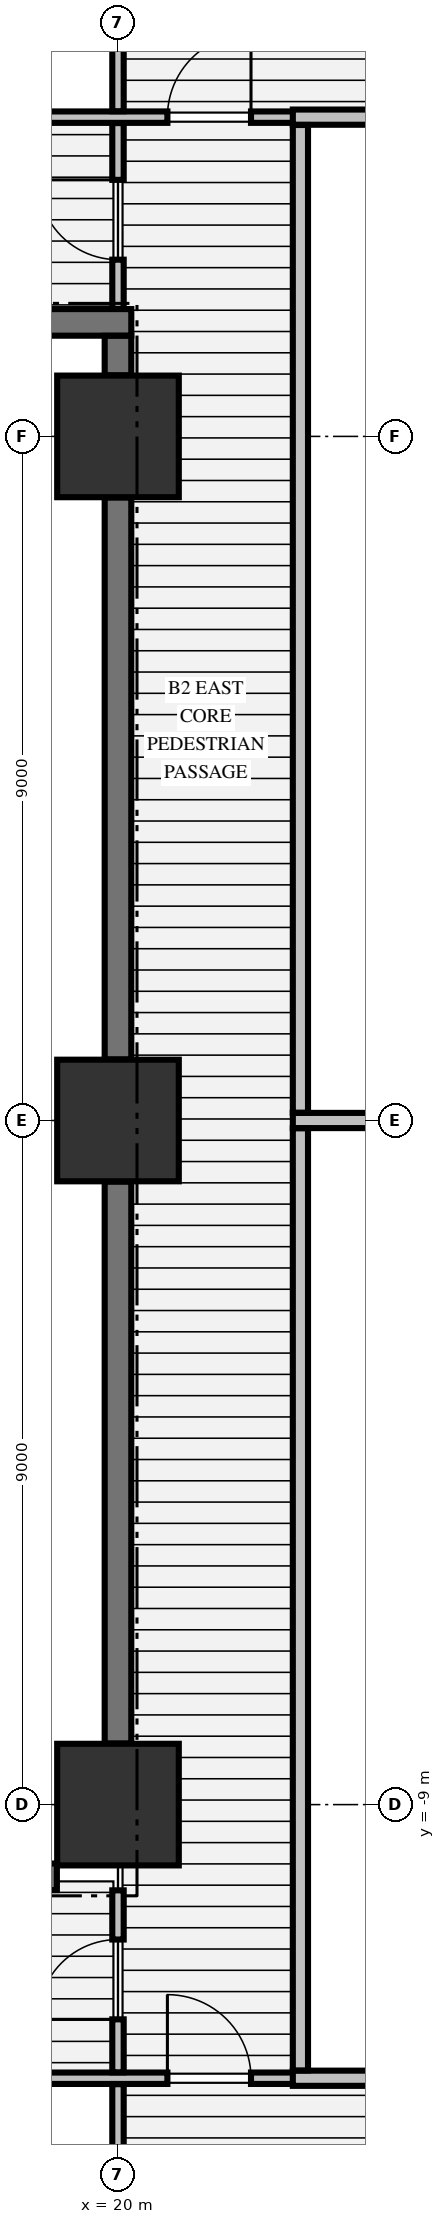
"""IFC4 building model, lengths in metres.
Left out: names, types, materials, properties, quantities, classifications, styles, units other than length and angle.
Written with IfcOpenShell. Run it as: python <this file> out.ifc"""

import sys

from ifc_helpers import new_model, si_unit, direction, frame, frame_2d, origin, origin_2d, place, context, subcontext, project, spatial, rectangle, extrude, element, fill, save


model = new_model("IFC4")
c1 = context("Model", 3, precision=1e-05, world=origin(), true_north=direction((0.0, 1.0)))
c2 = subcontext(c1, "Body", "Model", "MODEL_VIEW")
j1 = project(units=[si_unit("LENGTHUNIT", "METRE"), si_unit("PLANEANGLEUNIT", "RADIAN")], contexts=[c1])
p1 = place(None, origin())
s1 = spatial("IfcSite", under=j1, at=p1, CompositionType="ELEMENT")
p2 = place(p1, origin())
s2 = spatial("IfcBuilding", under=s1, at=p2, CompositionType="ELEMENT")
p3 = place(p2, frame((0.0, 0.0, -9.1)))
s3 = spatial("IfcBuildingStorey", under=s2, at=p3, CompositionType="ELEMENT", Elevation=-9.1)
for number, where, z_axis, x_axis in (
    (1, (20.0, -9.0, -0.45), (0.0, 0.0, 1.0), (1.0, 0.0, 0.0)),
    (2, (20.0, 0.0, -0.45), (0.0, 0.0, 1.0), (1.0, 0.0, 0.0)),
    (3, (20.0, 9.0, -0.45), (0.0, 0.0, 1.0), (1.0, 0.0, 0.0)),
):
    element("IfcColumn", number, at=place(p3, frame(where, z_axis=z_axis, x_axis=x_axis)), inside=s3, PredefinedType="COLUMN", context=c2, shape_type="SweptSolid", body=[
        extrude(rectangle(XDim=1.6, YDim=1.6, at=origin_2d()), origin(), (0.0, 0.0, 1.0), 4.65),
    ])
p4 = place(p3, frame((14.7, -9.95, 0.0), z_axis=(0.0, 0.0, 1.0), x_axis=(1.0, 0.0, 0.0)))
e4 = element("IfcWall", 4, at=p4, inside=s3, PredefinedType="SHEAR", context=c2, shape_type="SweptSolid", body=[
    extrude(rectangle(XDim=4.496, YDim=0.35, at=frame_2d((2.248, 0.0))), origin(), (0.0, 0.0, 1.0), 4.2),
])
p5 = place(p3, frame((14.7, 10.5, 0.0), z_axis=(0.0, 0.0, 1.0), x_axis=(1.0, 0.0, 0.0)))
e5 = element("IfcWall", 5, at=p5, inside=s3, PredefinedType="SHEAR", context=c2, shape_type="SweptSolid", body=[
    extrude(rectangle(XDim=5.475, YDim=0.35, at=frame_2d((2.738, 0.0))), origin(), (0.0, 0.0, 1.0), 4.2),
])
p6 = place(p5, frame((2.1, 0.0, 0.0)))
e6 = element("IfcOpeningElement", 6, at=p6, cuts=e5, PredefinedType="OPENING", context=c2, shape_type="SweptSolid", body=[
    extrude(rectangle(XDim=1.1, YDim=2.15, at=frame_2d((0.55, 1.075))), frame((0.0, 0.185, 0.0), z_axis=(0.0, -1.0, 0.0), x_axis=(1.0, 0.0, 0.0)), (0.0, 0.0, 1.0), 0.37),
])
p7 = place(p3, frame((-33.722, -12.6, 0.0), z_axis=(0.0, 0.0, 1.0), x_axis=(1.0, 0.0, 0.0)))
e7 = element("IfcWall", 7, at=p7, inside=s3, PredefinedType="PARTITIONING", context=c2, shape_type="SweptSolid", body=[
    extrude(rectangle(XDim=56.222, YDim=0.15, at=frame_2d((28.111, 0.0))), origin(), (0.0, 0.0, 1.0), 3.74),
])
p8 = place(p7, frame((11.972, 0.0, 0.0)))
e8 = element("IfcOpeningElement", 8, at=p8, cuts=e7, PredefinedType="OPENING", context=c2, shape_type="SweptSolid", body=[
    extrude(rectangle(XDim=1.1, YDim=2.15, at=frame_2d((0.55, 1.075))), frame((0.0, 0.085, 0.0), z_axis=(0.0, -1.0, 0.0), x_axis=(1.0, 0.0, 0.0)), (0.0, 0.0, 1.0), 0.17),
])
p9 = place(p7, frame((54.372, 0.0, 0.0)))
e9 = element("IfcOpeningElement", 9, at=p9, cuts=e7, PredefinedType="OPENING", context=c2, shape_type="SweptSolid", body=[
    extrude(rectangle(XDim=1.1, YDim=2.15, at=frame_2d((0.55, 1.075))), frame((0.0, 0.085, 0.0), z_axis=(0.0, -1.0, 0.0), x_axis=(1.0, 0.0, 0.0)), (0.0, 0.0, 1.0), 0.17),
])
p10 = place(p7, frame((38.622, 0.0, 0.0)))
e10 = element("IfcOpeningElement", 10, at=p10, cuts=e7, PredefinedType="OPENING", context=c2, shape_type="SweptSolid", body=[
    extrude(rectangle(XDim=1.2, YDim=2.15, at=frame_2d((0.6, 1.075))), frame((0.0, 0.085, 0.0), z_axis=(0.0, -1.0, 0.0), x_axis=(1.0, 0.0, 0.0)), (0.0, 0.0, 1.0), 0.17),
])
p11 = place(p3, frame((22.3, -12.6, 0.0), z_axis=(0.0, 0.0, 1.0), x_axis=(1.0, 0.0, 0.0)))
e11 = element("IfcWall", 11, at=p11, inside=s3, PredefinedType="PARTITIONING", context=c2, shape_type="SweptSolid", body=[
    extrude(rectangle(XDim=11.422, YDim=0.2, at=frame_2d((5.711, 0.0))), origin(), (0.0, 0.0, 1.0), 3.74),
])
p12 = place(p11, frame((1.6, 0.0, 0.0)))
e12 = element("IfcOpeningElement", 12, at=p12, cuts=e11, PredefinedType="OPENING", context=c2, shape_type="SweptSolid", body=[
    extrude(rectangle(XDim=1.2, YDim=2.15, at=frame_2d((0.6, 1.075))), frame((0.0, 0.11, 0.0), z_axis=(0.0, -1.0, 0.0), x_axis=(1.0, 0.0, 0.0)), (0.0, 0.0, 1.0), 0.22),
])
p13 = place(p3, frame((22.3, 0.0, 0.0), z_axis=(0.0, 0.0, 1.0), x_axis=(1.0, 0.0, 0.0)))
e13 = element("IfcWall", 13, at=p13, inside=s3, PredefinedType="PARTITIONING", context=c2, shape_type="SweptSolid", body=[
    extrude(rectangle(XDim=2.994, YDim=0.2, at=frame_2d((1.497, 0.0))), origin(), (0.0, 0.0, 1.0), 3.242),
])
p14 = place(p3, frame((-22.5, 13.2, 0.0), z_axis=(0.0, 0.0, 1.0), x_axis=(1.0, 0.0, 0.0)))
e14 = element("IfcWall", 14, at=p14, inside=s3, PredefinedType="PARTITIONING", context=c2, shape_type="SweptSolid", body=[
    extrude(rectangle(XDim=45.0, YDim=0.15, at=frame_2d((22.5, 0.0))), origin(), (0.0, 0.0, 1.0), 4.2),
])
p15 = place(p14, frame((43.15, 0.0, 0.0)))
e15 = element("IfcOpeningElement", 15, at=p15, cuts=e14, PredefinedType="OPENING", context=c2, shape_type="SweptSolid", body=[
    extrude(rectangle(XDim=1.1, YDim=2.15, at=frame_2d((0.55, 1.075))), frame((0.0, 0.085, 0.0), z_axis=(0.0, -1.0, 0.0), x_axis=(1.0, 0.0, 0.0)), (0.0, 0.0, 1.0), 0.17),
])
p16 = place(p14, frame((27.4, 0.0, 0.0)))
e16 = element("IfcOpeningElement", 16, at=p16, cuts=e14, PredefinedType="OPENING", context=c2, shape_type="SweptSolid", body=[
    extrude(rectangle(XDim=1.2, YDim=2.15, at=frame_2d((0.6, 1.075))), frame((0.0, 0.085, 0.0), z_axis=(0.0, -1.0, 0.0), x_axis=(1.0, 0.0, 0.0)), (0.0, 0.0, 1.0), 0.17),
])
p17 = place(p3, frame((22.3, 13.2, 0.0), z_axis=(0.0, 0.0, 1.0), x_axis=(1.0, 0.0, 0.0)))
e17 = element("IfcWall", 17, at=p17, inside=s3, PredefinedType="PARTITIONING", context=c2, shape_type="SweptSolid", body=[
    extrude(rectangle(XDim=11.422, YDim=0.2, at=frame_2d((5.711, 0.0))), origin(), (0.0, 0.0, 1.0), 4.2),
])
p18 = place(p17, frame((1.6, 0.0, 0.0)))
e18 = element("IfcOpeningElement", 18, at=p18, cuts=e17, PredefinedType="OPENING", context=c2, shape_type="SweptSolid", body=[
    extrude(rectangle(XDim=1.2, YDim=2.15, at=frame_2d((0.6, 1.075))), frame((0.0, 0.11, 0.0), z_axis=(0.0, -1.0, 0.0), x_axis=(1.0, 0.0, 0.0)), (0.0, 0.0, 1.0), 0.22),
])
for number, where, z_axis, x_axis in (
    (19, (20.0, -8.196, 0.0), (0.0, 0.0, 1.0), (0.0, 1.0, 0.0)),
    (20, (20.0, 0.804, 0.0), (0.0, 0.0, 1.0), (0.0, 1.0, 0.0)),
):
    element("IfcWall", number, at=place(p3, frame(where, z_axis=z_axis, x_axis=x_axis)), inside=s3, PredefinedType="SHEAR", context=c2, shape_type="SweptSolid", body=[
        extrude(rectangle(XDim=7.392, YDim=0.35, at=frame_2d((3.696, 0.0))), origin(), (0.0, 0.0, 1.0), 4.2),
    ])
p19 = place(p3, frame((20.0, 9.804, 0.0), z_axis=(0.0, 0.0, 1.0), x_axis=(0.0, 1.0, 0.0)))
e21 = element("IfcWall", 21, at=p19, inside=s3, PredefinedType="SHEAR", context=c2, shape_type="SweptSolid", body=[
    extrude(rectangle(XDim=0.519, YDim=0.35, at=frame_2d((0.26, 0.0))), origin(), (0.0, 0.0, 1.0), 4.2),
])
p20 = place(p3, frame((20.0, -15.194, 0.0), z_axis=(0.0, 0.0, 1.0), x_axis=(0.0, 1.0, 0.0)))
e22 = element("IfcWall", 22, at=p20, inside=s3, PredefinedType="PARTITIONING", context=c2, shape_type="SweptSolid", body=[
    extrude(rectangle(XDim=2.516, YDim=0.15, at=frame_2d((1.258, 0.0))), origin(), (0.0, 0.0, 1.0), 3.242),
])
p21 = place(p3, frame((20.0, -12.522, 0.0), z_axis=(0.0, 0.0, 1.0), x_axis=(0.0, 1.0, 0.0)))
e23 = element("IfcWall", 23, at=p21, inside=s3, PredefinedType="PARTITIONING", context=c2, shape_type="SweptSolid", body=[
    extrude(rectangle(XDim=2.394, YDim=0.15, at=frame_2d((1.197, 0.0))), origin(), (0.0, 0.0, 1.0), 3.242),
])
p22 = place(p21, frame((0.697, 0.0, 0.0)))
e24 = element("IfcOpeningElement", 24, at=p22, cuts=e23, PredefinedType="OPENING", context=c2, shape_type="SweptSolid", body=[
    extrude(rectangle(XDim=1.05, YDim=2.15, at=frame_2d((0.525, 1.075))), frame((0.0, 0.085, 0.0), z_axis=(0.0, -1.0, 0.0), x_axis=(1.0, 0.0, 0.0)), (0.0, 0.0, 1.0), 0.17),
])
p23 = place(p3, frame((20.0, 10.678, 0.0), z_axis=(0.0, 0.0, 1.0), x_axis=(0.0, 1.0, 0.0)))
e25 = element("IfcWall", 25, at=p23, inside=s3, PredefinedType="PARTITIONING", context=c2, shape_type="SweptSolid", body=[
    extrude(rectangle(XDim=2.444, YDim=0.15, at=frame_2d((1.222, 0.0))), origin(), (0.0, 0.0, 1.0), 3.242),
])
p24 = place(p23, frame((0.647, 0.0, 0.0)))
e26 = element("IfcOpeningElement", 26, at=p24, cuts=e25, PredefinedType="OPENING", context=c2, shape_type="SweptSolid", body=[
    extrude(rectangle(XDim=1.05, YDim=2.15, at=frame_2d((0.525, 1.075))), frame((0.0, 0.085, 0.0), z_axis=(0.0, -1.0, 0.0), x_axis=(1.0, 0.0, 0.0)), (0.0, 0.0, 1.0), 0.17),
])
p25 = place(p3, frame((20.0, 13.278, 0.0), z_axis=(0.0, 0.0, 1.0), x_axis=(0.0, 1.0, 0.0)))
e27 = element("IfcWall", 27, at=p25, inside=s3, PredefinedType="PARTITIONING", context=c2, shape_type="SweptSolid", body=[
    extrude(rectangle(XDim=1.916, YDim=0.15, at=frame_2d((0.958, 0.0))), origin(), (0.0, 0.0, 1.0), 3.242),
])
p26 = place(p3, frame((22.4, -12.497, 0.0), z_axis=(0.0, 0.0, 1.0), x_axis=(0.0, 1.0, 0.0)))
e28 = element("IfcWall", 28, at=p26, inside=s3, PredefinedType="PARTITIONING", context=c2, shape_type="SweptSolid", body=[
    extrude(rectangle(XDim=12.394, YDim=0.2, at=frame_2d((6.197, 0.0))), origin(), (0.0, 0.0, 1.0), 4.2),
])
p27 = place(p3, frame((22.4, 0.103, 0.0), z_axis=(0.0, 0.0, 1.0), x_axis=(0.0, 1.0, 0.0)))
e29 = element("IfcWall", 29, at=p27, inside=s3, PredefinedType="PARTITIONING", context=c2, shape_type="SweptSolid", body=[
    extrude(rectangle(XDim=12.994, YDim=0.2, at=frame_2d((6.497, 0.0))), origin(), (0.0, 0.0, 1.0), 4.2),
])
p28 = place(p24, origin())
e30 = element("IfcDoor", 30, at=p28, inside=s3, OperationType="SINGLE_SWING_RIGHT", PredefinedType="DOOR", context=c2, shape_type="SweptSolid", body=[
    extrude(rectangle(XDim=1.05, YDim=2.15, at=frame_2d((0.525, 1.075))), frame((0.0, 0.025, 0.0), z_axis=(0.0, -1.0, 0.0), x_axis=(1.0, 0.0, 0.0)), (0.0, 0.0, 1.0), 0.05),
])
fill(e26, e30)
p29 = place(p22, origin())
e31 = element("IfcDoor", 31, at=p29, inside=s3, OperationType="SINGLE_SWING_LEFT", PredefinedType="DOOR", context=c2, shape_type="SweptSolid", body=[
    extrude(rectangle(XDim=1.05, YDim=2.15, at=frame_2d((0.525, 1.075))), frame((0.0, 0.025, 0.0), z_axis=(0.0, -1.0, 0.0), x_axis=(1.0, 0.0, 0.0)), (0.0, 0.0, 1.0), 0.05),
])
fill(e24, e31)
p30 = place(p15, origin())
e32 = element("IfcDoor", 32, at=p30, inside=s3, OperationType="SINGLE_SWING_RIGHT", PredefinedType="DOOR", context=c2, shape_type="SweptSolid", body=[
    extrude(rectangle(XDim=1.1, YDim=2.15, at=frame_2d((0.55, 1.075))), frame((0.0, 0.025, 0.0), z_axis=(0.0, -1.0, 0.0), x_axis=(1.0, 0.0, 0.0)), (0.0, 0.0, 1.0), 0.05),
])
fill(e15, e32)
p31 = place(p9, origin())
e33 = element("IfcDoor", 33, at=p31, inside=s3, OperationType="SINGLE_SWING_LEFT", PredefinedType="DOOR", context=c2, shape_type="SweptSolid", body=[
    extrude(rectangle(XDim=1.1, YDim=2.15, at=frame_2d((0.55, 1.075))), frame((0.0, 0.025, 0.0), z_axis=(0.0, -1.0, 0.0), x_axis=(1.0, 0.0, 0.0)), (0.0, 0.0, 1.0), 0.05),
])
fill(e9, e33)
save(model, sys.argv[1])
